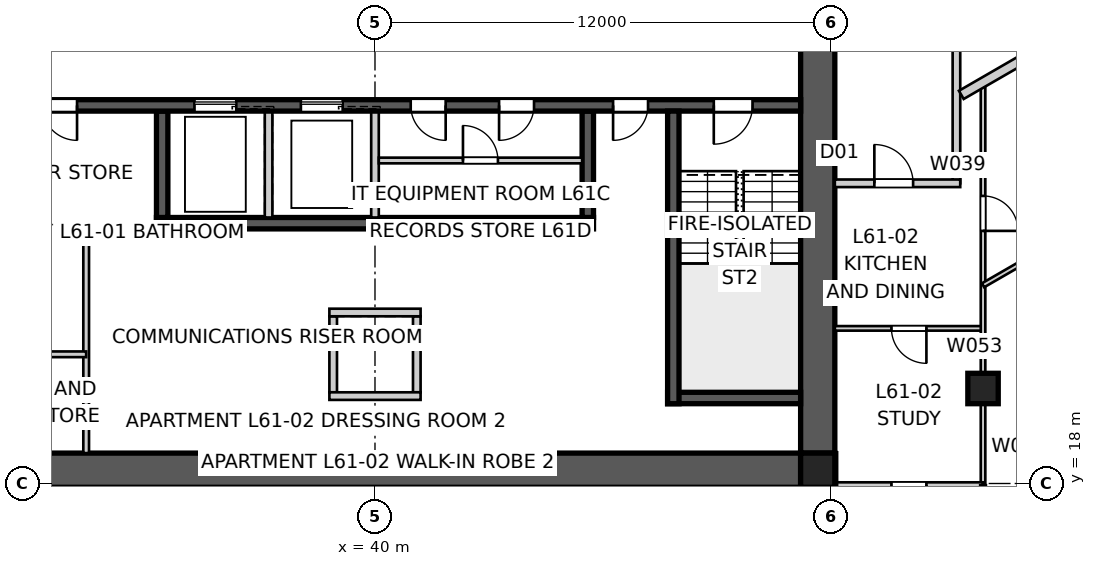
"""IFC4 building model, lengths in metres.
Left out: names, types, materials, properties, quantities, classifications, styles, units other than length and angle.
Written with IfcOpenShell. Run it as: python <this file> out.ifc"""

import sys

from ifc_helpers import new_model, si_unit, direction, frame, frame_2d, origin, origin_2d, place, context, subcontext, project, spatial, polyline, rectangle, outline, extrude, element, fill, save


model = new_model("IFC4")
c1 = context("Model", 3, precision=1e-05, world=origin(), true_north=direction((0.0, 1.0)))
c2 = subcontext(c1, "Body", "Model", "MODEL_VIEW")
j1 = project(units=[si_unit("LENGTHUNIT", "METRE"), si_unit("PLANEANGLEUNIT", "RADIAN")], contexts=[c1])
p1 = place(None, origin())
s1 = spatial("IfcSite", under=j1, at=p1, CompositionType="ELEMENT")
p2 = place(p1, origin())
s2 = spatial("IfcBuilding", under=s1, at=p2, CompositionType="ELEMENT")
p3 = place(p2, frame((0.0, 0.0, 221.8)))
s3 = spatial("IfcBuildingStorey", under=s2, at=p3, CompositionType="ELEMENT", Elevation=221.8)
p4 = place(p3, frame((51.2, 18.35, 0.0), z_axis=(0.0, 0.0, 1.0), x_axis=(-1.0, 0.0, 0.0)))
e1 = element("IfcWall", 1, at=p4, inside=s3, PredefinedType="SHEAR", context=c2, shape_type="SweptSolid", body=[
    extrude(outline(polyline([(0.0, -0.45), (22.4, -0.45), (22.4, -0.025), (22.85, -0.025), (22.85, 0.025), (22.4, 0.025), (22.4, 0.45), (0.0, 0.45), (0.0, 0.025), (-0.45, 0.025), (-0.45, -0.025), (0.0, -0.025), (0.0, -0.45)])), origin(), (0.0, 0.0, 1.0), 3.4),
])
p5 = place(p3, frame((51.65, 18.8, 0.0), z_axis=(0.0, 0.0, 1.0), x_axis=(0.0, 1.0, 0.0)))
e2 = element("IfcWall", 2, at=p5, inside=s3, PredefinedType="SHEAR", context=c2, shape_type="SweptSolid", body=[
    extrude(outline(polyline([(0.0, -0.45), (22.4, -0.45), (22.4, -0.025), (22.85, -0.025), (22.85, 0.025), (22.4, 0.025), (22.4, 0.45), (0.0, 0.45), (0.0, 0.025), (-0.45, 0.025), (-0.45, -0.025), (0.0, -0.025), (0.0, -0.45)])), origin(), (0.0, 0.0, 1.0), 3.4),
])
p6 = place(p5, frame((11.14, 0.0, 0.0)))
e3 = element("IfcOpeningElement", 3, at=p6, cuts=e2, PredefinedType="OPENING", context=c2, shape_type="SweptSolid", body=[
    extrude(rectangle(XDim=1.02, YDim=2.4, at=frame_2d((0.51, 1.2))), frame((0.0, 0.46, 0.0), z_axis=(0.0, -1.0, 0.0), x_axis=(1.0, 0.0, 0.0)), (0.0, 0.0, 1.0), 0.92),
])
p7 = place(p3, frame((51.2, 27.95, 0.0), z_axis=(0.0, 0.0, 1.0), x_axis=(-1.0, 0.0, 0.0)))
e4 = element("IfcWall", 4, at=p7, inside=s3, PredefinedType="SHEAR", context=c2, shape_type="SweptSolid", body=[
    extrude(rectangle(XDim=22.4, YDim=0.3, at=frame_2d((11.2, 0.0))), origin(), (0.0, 0.0, 1.0), 3.4),
])
p8 = place(p7, frame((19.04, 0.0, 0.0)))
e5 = element("IfcOpeningElement", 5, at=p8, cuts=e4, PredefinedType="OPENING", context=c2, shape_type="SweptSolid", body=[
    extrude(rectangle(XDim=0.92, YDim=2.1, at=frame_2d((0.46, 1.05))), frame((0.0, 0.16, 0.0), z_axis=(0.0, -1.0, 0.0), x_axis=(1.0, 0.0, 0.0)), (0.0, 0.0, 1.0), 0.32),
])
p9 = place(p7, frame((1.265, 0.0, 0.0)))
e6 = element("IfcOpeningElement", 6, at=p9, cuts=e4, PredefinedType="OPENING", context=c2, shape_type="SweptSolid", body=[
    extrude(rectangle(XDim=1.02, YDim=2.1, at=frame_2d((0.51, 1.05))), frame((0.0, 0.16, 0.0), z_axis=(0.0, -1.0, 0.0), x_axis=(1.0, 0.0, 0.0)), (0.0, 0.0, 1.0), 0.32),
])
p10 = place(p7, frame((4.015, 0.0, 0.0)))
e7 = element("IfcOpeningElement", 7, at=p10, cuts=e4, PredefinedType="OPENING", context=c2, shape_type="SweptSolid", body=[
    extrude(rectangle(XDim=0.92, YDim=2.1, at=frame_2d((0.46, 1.05))), frame((0.0, 0.16, 0.0), z_axis=(0.0, -1.0, 0.0), x_axis=(1.0, 0.0, 0.0)), (0.0, 0.0, 1.0), 0.32),
])
p11 = place(p7, frame((9.34, 0.0, 0.0)))
e8 = element("IfcOpeningElement", 8, at=p11, cuts=e4, PredefinedType="OPENING", context=c2, shape_type="SweptSolid", body=[
    extrude(rectangle(XDim=0.92, YDim=2.1, at=frame_2d((0.46, 1.05))), frame((0.0, 0.16, 0.0), z_axis=(0.0, -1.0, 0.0), x_axis=(1.0, 0.0, 0.0)), (0.0, 0.0, 1.0), 0.32),
])
p12 = place(p7, frame((7.015, 0.0, 0.0)))
e9 = element("IfcOpeningElement", 9, at=p12, cuts=e4, PredefinedType="OPENING", context=c2, shape_type="SweptSolid", body=[
    extrude(rectangle(XDim=0.92, YDim=2.1, at=frame_2d((0.46, 1.05))), frame((0.0, 0.16, 0.0), z_axis=(0.0, -1.0, 0.0), x_axis=(1.0, 0.0, 0.0)), (0.0, 0.0, 1.0), 0.32),
])
p13 = place(p7, frame((12.05, 0.0, 0.0)))
e10 = element("IfcOpeningElement", 10, at=p13, cuts=e4, PredefinedType="OPENING", context=c2, shape_type="SweptSolid", body=[
    extrude(rectangle(XDim=1.1, YDim=2.1, at=frame_2d((0.55, 1.05))), frame((0.0, 0.16, 0.0), z_axis=(0.0, -1.0, 0.0), x_axis=(1.0, 0.0, 0.0)), (0.0, 0.0, 1.0), 0.32),
])
p14 = place(p7, frame((14.85, 0.0, 0.0)))
e11 = element("IfcOpeningElement", 11, at=p14, cuts=e4, PredefinedType="OPENING", context=c2, shape_type="SweptSolid", body=[
    extrude(rectangle(XDim=1.1, YDim=2.1, at=frame_2d((0.55, 1.05))), frame((0.0, 0.16, 0.0), z_axis=(0.0, -1.0, 0.0), x_axis=(1.0, 0.0, 0.0)), (0.0, 0.0, 1.0), 0.32),
])
p15 = place(p3, frame((45.75, 24.85, 0.0), z_axis=(0.0, 0.0, 1.0), x_axis=(-1.0, 0.0, 0.0)))
e12 = element("IfcWall", 12, at=p15, inside=s3, PredefinedType="SHEAR", context=c2, shape_type="SweptSolid", body=[
    extrude(rectangle(XDim=11.5, YDim=0.3, at=frame_2d((5.75, 0.0))), origin(), (0.0, 0.0, 1.0), 3.4),
])
p16 = place(p3, frame((45.6, 27.8, 0.0), z_axis=(0.0, 0.0, 1.0), x_axis=(0.0, -1.0, 0.0)))
e13 = element("IfcWall", 13, at=p16, inside=s3, PredefinedType="SHEAR", context=c2, shape_type="SweptSolid", body=[
    extrude(rectangle(XDim=2.8, YDim=0.3, at=frame_2d((1.4, 0.0))), origin(), (0.0, 0.0, 1.0), 3.4),
])
for number, where, z_axis, x_axis in (
    (14, (40.0, 27.8, 0.0), (0.0, 0.0, 1.0), (0.0, -1.0, 0.0)),
    (15, (37.2, 27.8, 0.0), (0.0, 0.0, 1.0), (0.0, -1.0, 0.0)),
):
    element("IfcWall", number, at=place(p3, frame(where, z_axis=z_axis, x_axis=x_axis)), inside=s3, PredefinedType="SOLIDWALL", context=c2, shape_type="SweptSolid", body=[
        extrude(rectangle(XDim=2.8, YDim=0.2, at=frame_2d((1.4, 0.0))), origin(), (0.0, 0.0, 1.0), 3.4),
    ])
p17 = place(p3, frame((34.4, 27.8, 0.0), z_axis=(0.0, 0.0, 1.0), x_axis=(0.0, -1.0, 0.0)))
e16 = element("IfcWall", 16, at=p17, inside=s3, PredefinedType="SHEAR", context=c2, shape_type="SweptSolid", body=[
    extrude(rectangle(XDim=2.8, YDim=0.3, at=frame_2d((1.4, 0.0))), origin(), (0.0, 0.0, 1.0), 3.4),
])
p18 = place(p3, frame((47.85, 27.8, 0.0), z_axis=(0.0, 0.0, 1.0), x_axis=(0.0, -1.0, 0.0)))
e17 = element("IfcWall", 17, at=p18, inside=s3, PredefinedType="SHEAR", context=c2, shape_type="SweptSolid", body=[
    extrude(rectangle(XDim=7.7, YDim=0.3, at=frame_2d((3.85, 0.0))), origin(), (0.0, 0.0, 1.0), 3.4),
])
p19 = place(p3, frame((51.2, 20.25, 0.0), z_axis=(0.0, 0.0, 1.0), x_axis=(-1.0, 0.0, 0.0)))
e18 = element("IfcWall", 18, at=p19, inside=s3, PredefinedType="SHEAR", context=c2, shape_type="SweptSolid", body=[
    extrude(rectangle(XDim=3.5, YDim=0.3, at=frame_2d((1.75, 0.0))), origin(), (0.0, 0.0, 1.0), 3.4),
])
for number, where, z_axis, x_axis in (
    (19, (38.9, 22.4, 0.0), (0.0, 0.0, 1.0), (0.0, -1.0, 0.0)),
    (20, (41.1, 22.4, 0.0), (0.0, 0.0, 1.0), (0.0, -1.0, 0.0)),
):
    element("IfcWall", number, at=place(p3, frame(where, z_axis=z_axis, x_axis=x_axis)), inside=s3, PredefinedType="SOLIDWALL", context=c2, shape_type="SweptSolid", body=[
        extrude(rectangle(XDim=2.0, YDim=0.2, at=frame_2d((1.0, 0.0))), origin(), (0.0, 0.0, 1.0), 3.4),
    ])
for number, where, z_axis, x_axis in (
    (21, (38.8, 22.5, 0.0), (0.0, 0.0, 1.0), (1.0, 0.0, 0.0)),
    (22, (38.8, 20.3, 0.0), (0.0, 0.0, 1.0), (1.0, 0.0, 0.0)),
):
    element("IfcWall", number, at=place(p3, frame(where, z_axis=z_axis, x_axis=x_axis)), inside=s3, PredefinedType="SOLIDWALL", context=c2, shape_type="SweptSolid", body=[
        extrude(rectangle(XDim=2.4, YDim=0.2, at=frame_2d((1.2, 0.0))), origin(), (0.0, 0.0, 1.0), 3.4),
    ])
p20 = place(p3, frame((51.65, 18.35, 0.0), z_axis=(0.0, 0.0, 1.0), x_axis=(1.0, 0.0, 0.0)))
e23 = element("IfcColumn", 23, at=p20, inside=s3, PredefinedType="COLUMN", context=c2, shape_type="SweptSolid", body=[
    extrude(rectangle(XDim=0.9, YDim=0.9, at=origin_2d()), origin(), (0.0, 0.0, 1.0), 3.4),
])
p21 = place(p3, frame((56.0, 20.5, 0.0), z_axis=(0.0, 0.0, 1.0), x_axis=(1.0, 0.0, 0.0)))
e24 = element("IfcColumn", 24, at=p21, inside=s3, PredefinedType="COLUMN", context=c2, shape_type="SweptSolid", body=[
    extrude(rectangle(XDim=0.8, YDim=0.8, at=origin_2d()), origin(), (0.0, 0.0, 1.0), 3.4),
])
p22 = place(p3, frame((55.3, 25.9, 0.0), z_axis=(0.0, 0.0, 1.0), x_axis=(0.0, 1.0, 0.0)))
e25 = element("IfcWall", 25, at=p22, inside=s3, PredefinedType="PARTITIONING", context=c2, shape_type="SweptSolid", body=[
    extrude(rectangle(XDim=8.2, YDim=0.2, at=frame_2d((4.1, 0.0))), origin(), (0.0, 0.0, 1.0), 3.25),
])
p23 = place(p3, frame((52.1, 25.9, 0.0), z_axis=(0.0, 0.0, 1.0), x_axis=(1.0, 0.0, 0.0)))
e26 = element("IfcWall", 26, at=p23, inside=s3, PredefinedType="PARTITIONING", context=c2, shape_type="SweptSolid", body=[
    extrude(rectangle(XDim=3.3, YDim=0.2, at=frame_2d((1.65, 0.0))), origin(), (0.0, 0.0, 1.0), 3.25),
])
p24 = place(p23, frame((1.04, 0.0, 0.0)))
e27 = element("IfcOpeningElement", 27, at=p24, cuts=e26, PredefinedType="OPENING", context=c2, shape_type="SweptSolid", body=[
    extrude(rectangle(XDim=1.02, YDim=2.34, at=frame_2d((0.51, 1.17))), frame((0.0, 0.11, 0.0), z_axis=(0.0, -1.0, 0.0), x_axis=(1.0, 0.0, 0.0)), (0.0, 0.0, 1.0), 0.22),
])
p25 = place(p3, frame((64.111, 33.239, 0.0), z_axis=(0.0, 0.0, 1.0), x_axis=(-0.866024190901, -0.50000210077, 0.0)))
e28 = element("IfcWall", 28, at=p25, inside=s3, PredefinedType="PARTITIONING", context=c2, shape_type="SweptSolid", body=[
    extrude(rectangle(XDim=10.026, YDim=0.25, at=frame_2d((5.013, 0.0))), origin(), (0.0, 0.0, 1.0), 3.25),
])
p26 = place(p25, frame((2.229, 0.0, 0.0)))
e29 = element("IfcOpeningElement", 29, at=p26, cuts=e28, PredefinedType="OPENING", context=c2, shape_type="SweptSolid", body=[
    extrude(rectangle(XDim=0.92, YDim=2.34, at=frame_2d((0.46, 1.17))), frame((0.0, 0.135, 0.0), z_axis=(0.0, -1.0, 0.0), x_axis=(1.0, 0.0, 0.0)), (0.0, 0.0, 1.0), 0.27),
])
p27 = place(p3, frame((32.4, 18.8, 0.0), z_axis=(0.0, 0.0, 1.0), x_axis=(0.0, 1.0, 0.0)))
e30 = element("IfcWall", 30, at=p27, inside=s3, PredefinedType="SOLIDWALL", context=c2, shape_type="SweptSolid", body=[
    extrude(rectangle(XDim=5.9, YDim=0.15, at=frame_2d((2.95, 0.0))), origin(), (0.0, 0.0, 1.0), 3.25),
])
p28 = place(p3, frame((32.4, 24.7, 0.0), z_axis=(0.0, 0.0, 1.0), x_axis=(1.0, 0.0, 0.0)))
e31 = element("IfcWall", 31, at=p28, inside=s3, PredefinedType="SOLIDWALL", context=c2, shape_type="SweptSolid", body=[
    extrude(rectangle(XDim=1.85, YDim=0.15, at=frame_2d((0.925, 0.0))), origin(), (0.0, 0.0, 1.0), 3.25),
])
p29 = place(p3, frame((32.4, 21.4, 0.0), z_axis=(0.0, 0.0, 1.0), x_axis=(-1.0, 0.0, 0.0)))
e32 = element("IfcWall", 32, at=p29, inside=s3, PredefinedType="SOLIDWALL", context=c2, shape_type="SweptSolid", body=[
    extrude(rectangle(XDim=3.6, YDim=0.15, at=frame_2d((1.8, 0.0))), origin(), (0.0, 0.0, 1.0), 3.25),
])
p30 = place(p29, frame((1.34, 0.0, 0.0)))
e33 = element("IfcOpeningElement", 33, at=p30, cuts=e32, PredefinedType="OPENING", context=c2, shape_type="SweptSolid", body=[
    extrude(rectangle(XDim=0.92, YDim=2.1, at=frame_2d((0.46, 1.05))), frame((0.0, 0.085, 0.0), z_axis=(0.0, -1.0, 0.0), x_axis=(1.0, 0.0, 0.0)), (0.0, 0.0, 1.0), 0.17),
])
p31 = place(p3, frame((56.0, 22.083, 0.0), z_axis=(0.0, 0.0, 1.0), x_axis=(-1.0, 0.0, 0.0)))
e34 = element("IfcWall", 34, at=p31, inside=s3, PredefinedType="PARTITIONING", context=c2, shape_type="SweptSolid", body=[
    extrude(rectangle(XDim=3.9, YDim=0.12, at=frame_2d((1.95, 0.0))), origin(), (0.0, 0.0, 1.0), 3.25),
])
p32 = place(p31, frame((1.49, 0.0, 0.0)))
e35 = element("IfcOpeningElement", 35, at=p32, cuts=e34, PredefinedType="OPENING", context=c2, shape_type="SweptSolid", body=[
    extrude(rectangle(XDim=0.92, YDim=2.34, at=frame_2d((0.46, 1.17))), frame((0.0, 0.07, 0.0), z_axis=(0.0, -1.0, 0.0), x_axis=(1.0, 0.0, 0.0)), (0.0, 0.0, 1.0), 0.14),
])
p33 = place(p3, frame((56.0, 28.557, 0.0), z_axis=(0.0, 0.0, 1.0), x_axis=(0.0, -1.0, 0.0)))
e36 = element("IfcWall", 36, at=p33, inside=s3, PredefinedType="PARTITIONING", context=c2, shape_type="SweptSolid", body=[
    extrude(rectangle(XDim=10.601, YDim=0.12, at=frame_2d((5.3, 0.0))), origin(), (0.0, 0.0, 1.0), 2.55),
])
p34 = place(p33, frame((2.989, 0.0, 0.0)))
e37 = element("IfcOpeningElement", 37, at=p34, cuts=e36, PredefinedType="OPENING", context=c2, shape_type="SweptSolid", body=[
    extrude(rectangle(XDim=0.92, YDim=2.34, at=frame_2d((0.46, 1.17))), frame((0.0, 0.07, 0.0), z_axis=(0.0, -1.0, 0.0), x_axis=(1.0, 0.0, 0.0)), (0.0, 0.0, 1.0), 0.14),
])
p35 = place(p3, frame((56.0, 17.956, 0.0), z_axis=(0.0, 0.0, 1.0), x_axis=(-1.0, 0.0, 0.0)))
e38 = element("IfcWall", 38, at=p35, inside=s3, PredefinedType="SOLIDWALL", context=c2, shape_type="SweptSolid", body=[
    extrude(rectangle(XDim=3.9, YDim=0.15, at=frame_2d((1.95, 0.0))), origin(), (0.0, 0.0, 1.0), 3.25),
])
p36 = place(p35, frame((1.49, 0.0, 0.0)))
e39 = element("IfcOpeningElement", 39, at=p36, cuts=e38, PredefinedType="OPENING", context=c2, shape_type="SweptSolid", body=[
    extrude(rectangle(XDim=0.92, YDim=2.1, at=frame_2d((0.46, 1.05))), frame((0.0, 0.085, 0.0), z_axis=(0.0, -1.0, 0.0), x_axis=(1.0, 0.0, 0.0)), (0.0, 0.0, 1.0), 0.17),
])
p37 = place(p3, frame((52.1, 17.956, 0.0), z_axis=(0.0, 0.0, 1.0), x_axis=(0.0, 1.0, 0.0)))
e40 = element("IfcWall", 40, at=p37, inside=s3, PredefinedType="PARTITIONING", context=c2, shape_type="SweptSolid", body=[
    extrude(rectangle(XDim=0.864, YDim=0.12, at=frame_2d((0.432, 0.0))), origin(), (0.0, 0.0, 1.0), 3.25),
])
p38 = place(p3, frame((56.0, 17.956, 0.0), z_axis=(0.0, 0.0, 1.0), x_axis=(0.0, -1.0, 0.0)))
e41 = element("IfcWall", 41, at=p38, inside=s3, PredefinedType="SOLIDWALL", context=c2, shape_type="SweptSolid", body=[
    extrude(rectangle(XDim=3.956, YDim=0.15, at=frame_2d((1.978, 0.0))), origin(), (0.0, 0.0, 1.0), 3.25),
])
p39 = place(p3, frame((56.0, 23.216, 0.0), z_axis=(0.0, 0.0, 1.0), x_axis=(0.866023917076, 0.500002575046, 0.0)))
e42 = element("IfcWall", 42, at=p39, inside=s3, PredefinedType="PARTITIONING", context=c2, shape_type="SweptSolid", body=[
    extrude(rectangle(XDim=11.996, YDim=0.12, at=frame_2d((5.998, 0.0))), origin(), (0.0, 0.0, 1.0), 3.25),
])
p40 = place(p39, frame((1.245, 0.0, 0.0)))
e43 = element("IfcOpeningElement", 43, at=p40, cuts=e42, PredefinedType="OPENING", context=c2, shape_type="SweptSolid", body=[
    extrude(rectangle(XDim=0.92, YDim=2.34, at=frame_2d((0.46, 1.17))), frame((0.0, 0.07, 0.0), z_axis=(0.0, -1.0, 0.0), x_axis=(1.0, 0.0, 0.0)), (0.0, 0.0, 1.0), 0.14),
])
p41 = place(p39, frame((4.599, 0.0, 0.0)))
e44 = element("IfcOpeningElement", 44, at=p41, cuts=e42, PredefinedType="OPENING", context=c2, shape_type="SweptSolid", body=[
    extrude(rectangle(XDim=0.92, YDim=2.34, at=frame_2d((0.46, 1.17))), frame((0.0, 0.07, 0.0), z_axis=(0.0, -1.0, 0.0), x_axis=(1.0, 0.0, 0.0)), (0.0, 0.0, 1.0), 0.14),
])
p42 = place(p39, frame((9.394, 0.0, 0.0)))
e45 = element("IfcOpeningElement", 45, at=p42, cuts=e42, PredefinedType="OPENING", context=c2, shape_type="SweptSolid", body=[
    extrude(rectangle(XDim=0.92, YDim=2.34, at=frame_2d((0.46, 1.17))), frame((0.0, 0.07, 0.0), z_axis=(0.0, -1.0, 0.0), x_axis=(1.0, 0.0, 0.0)), (0.0, 0.0, 1.0), 0.14),
])
p43 = place(p3, frame((51.757, 17.9, 0.0), z_axis=(0.0, 0.0, 1.0), x_axis=(0.986864404584, 0.161550756622, 0.0)))
e46 = element("IfcWall", 46, at=p43, inside=s3, PredefinedType="SOLIDWALL", context=c2, shape_type="SweptSolid", body=[
    extrude(rectangle(XDim=0.348, YDim=0.15, at=frame_2d((0.174, 0.0))), origin(), (0.0, 0.0, 1.0), 3.25),
])
p44 = place(p3, frame((40.1, 26.5, 0.0), z_axis=(0.0, 0.0, 1.0), x_axis=(1.0, 0.0, 0.0)))
e47 = element("IfcWall", 47, at=p44, inside=s3, PredefinedType="SOLIDWALL", context=c2, shape_type="SweptSolid", body=[
    extrude(rectangle(XDim=5.35, YDim=0.15, at=frame_2d((2.675, 0.0))), origin(), (0.0, 0.0, 1.0), 3.25),
])
p45 = place(p44, frame((2.215, 0.0, 0.0)))
e48 = element("IfcOpeningElement", 48, at=p45, cuts=e47, PredefinedType="OPENING", context=c2, shape_type="SweptSolid", body=[
    extrude(rectangle(XDim=0.92, YDim=2.1, at=frame_2d((0.46, 1.05))), frame((0.0, 0.085, 0.0), z_axis=(0.0, -1.0, 0.0), x_axis=(1.0, 0.0, 0.0)), (0.0, 0.0, 1.0), 0.17),
])
p46 = place(p8, origin())
e49 = element("IfcDoor", 49, at=p46, inside=s3, OperationType="SINGLE_SWING_LEFT", PredefinedType="DOOR", context=c2, shape_type="SweptSolid", body=[
    extrude(rectangle(XDim=0.92, YDim=2.1, at=frame_2d((0.46, 1.05))), frame((0.0, 0.025, 0.0), z_axis=(0.0, -1.0, 0.0), x_axis=(1.0, 0.0, 0.0)), (0.0, 0.0, 1.0), 0.05),
])
fill(e5, e49)
p47 = place(p9, origin())
e50 = element("IfcDoor", 50, at=p47, inside=s3, OperationType="SINGLE_SWING_RIGHT", PredefinedType="DOOR", context=c2, shape_type="SweptSolid", body=[
    extrude(rectangle(XDim=1.02, YDim=2.1, at=frame_2d((0.51, 1.05))), frame((0.0, 0.025, 0.0), z_axis=(0.0, -1.0, 0.0), x_axis=(1.0, 0.0, 0.0)), (0.0, 0.0, 1.0), 0.05),
])
fill(e6, e50)
p48 = place(p10, origin())
e51 = element("IfcDoor", 51, at=p48, inside=s3, OperationType="SINGLE_SWING_RIGHT", PredefinedType="DOOR", context=c2, shape_type="SweptSolid", body=[
    extrude(rectangle(XDim=0.92, YDim=2.1, at=frame_2d((0.46, 1.05))), frame((0.0, 0.025, 0.0), z_axis=(0.0, -1.0, 0.0), x_axis=(1.0, 0.0, 0.0)), (0.0, 0.0, 1.0), 0.05),
])
fill(e7, e51)
p49 = place(p24, origin())
e52 = element("IfcDoor", 52, at=p49, inside=s3, OperationType="SINGLE_SWING_LEFT", PredefinedType="DOOR", context=c2, shape_type="SweptSolid", body=[
    extrude(rectangle(XDim=1.02, YDim=2.34, at=frame_2d((0.51, 1.17))), frame((0.0, 0.025, 0.0), z_axis=(0.0, -1.0, 0.0), x_axis=(1.0, 0.0, 0.0)), (0.0, 0.0, 1.0), 0.05),
])
fill(e27, e52)
p50 = place(p34, origin())
e53 = element("IfcDoor", 53, at=p50, inside=s3, OperationType="SINGLE_SWING_RIGHT", PredefinedType="DOOR", context=c2, shape_type="SweptSolid", body=[
    extrude(rectangle(XDim=0.92, YDim=2.34, at=frame_2d((0.46, 1.17))), frame((0.0, 0.025, 0.0), z_axis=(0.0, -1.0, 0.0), x_axis=(1.0, 0.0, 0.0)), (0.0, 0.0, 1.0), 0.05),
])
fill(e37, e53)
p51 = place(p32, origin())
e54 = element("IfcDoor", 54, at=p51, inside=s3, OperationType="SINGLE_SWING_LEFT", PredefinedType="DOOR", context=c2, shape_type="SweptSolid", body=[
    extrude(rectangle(XDim=0.92, YDim=2.34, at=frame_2d((0.46, 1.17))), frame((0.0, 0.025, 0.0), z_axis=(0.0, -1.0, 0.0), x_axis=(1.0, 0.0, 0.0)), (0.0, 0.0, 1.0), 0.05),
])
fill(e35, e54)
p52 = place(p36, origin())
e55 = element("IfcDoor", 55, at=p52, inside=s3, OperationType="SINGLE_SWING_LEFT", PredefinedType="DOOR", context=c2, shape_type="SweptSolid", body=[
    extrude(rectangle(XDim=0.92, YDim=2.1, at=frame_2d((0.46, 1.05))), frame((0.0, 0.025, 0.0), z_axis=(0.0, -1.0, 0.0), x_axis=(1.0, 0.0, 0.0)), (0.0, 0.0, 1.0), 0.05),
])
fill(e39, e55)
p53 = place(p11, origin())
e56 = element("IfcDoor", 56, at=p53, inside=s3, OperationType="SINGLE_SWING_LEFT", PredefinedType="DOOR", context=c2, shape_type="SweptSolid", body=[
    extrude(rectangle(XDim=0.92, YDim=2.1, at=frame_2d((0.46, 1.05))), frame((0.0, 0.025, 0.0), z_axis=(0.0, -1.0, 0.0), x_axis=(1.0, 0.0, 0.0)), (0.0, 0.0, 1.0), 0.05),
])
fill(e8, e56)
p54 = place(p12, origin())
e57 = element("IfcDoor", 57, at=p54, inside=s3, OperationType="SINGLE_SWING_RIGHT", PredefinedType="DOOR", context=c2, shape_type="SweptSolid", body=[
    extrude(rectangle(XDim=0.92, YDim=2.1, at=frame_2d((0.46, 1.05))), frame((0.0, 0.025, 0.0), z_axis=(0.0, -1.0, 0.0), x_axis=(1.0, 0.0, 0.0)), (0.0, 0.0, 1.0), 0.05),
])
fill(e9, e57)
p55 = place(p45, origin())
e58 = element("IfcDoor", 58, at=p55, inside=s3, OperationType="SINGLE_SWING_LEFT", PredefinedType="DOOR", context=c2, shape_type="SweptSolid", body=[
    extrude(rectangle(XDim=0.92, YDim=2.1, at=frame_2d((0.46, 1.05))), frame((0.0, 0.025, 0.0), z_axis=(0.0, -1.0, 0.0), x_axis=(1.0, 0.0, 0.0)), (0.0, 0.0, 1.0), 0.05),
])
fill(e48, e58)
p56 = place(p13, origin())
e59 = element("IfcDoor", 59, at=p56, inside=s3, OperationType="SLIDING_TO_LEFT", PredefinedType="DOOR", context=c2, shape_type="SweptSolid", body=[
    extrude(rectangle(XDim=1.1, YDim=2.1, at=frame_2d((0.55, 1.05))), frame((0.0, 0.025, 0.0), z_axis=(0.0, -1.0, 0.0), x_axis=(1.0, 0.0, 0.0)), (0.0, 0.0, 1.0), 0.05),
])
fill(e10, e59)
p57 = place(p14, origin())
e60 = element("IfcDoor", 60, at=p57, inside=s3, OperationType="SLIDING_TO_LEFT", PredefinedType="DOOR", context=c2, shape_type="SweptSolid", body=[
    extrude(rectangle(XDim=1.1, YDim=2.1, at=frame_2d((0.55, 1.05))), frame((0.0, 0.025, 0.0), z_axis=(0.0, -1.0, 0.0), x_axis=(1.0, 0.0, 0.0)), (0.0, 0.0, 1.0), 0.05),
])
fill(e11, e60)
save(model, sys.argv[1])
